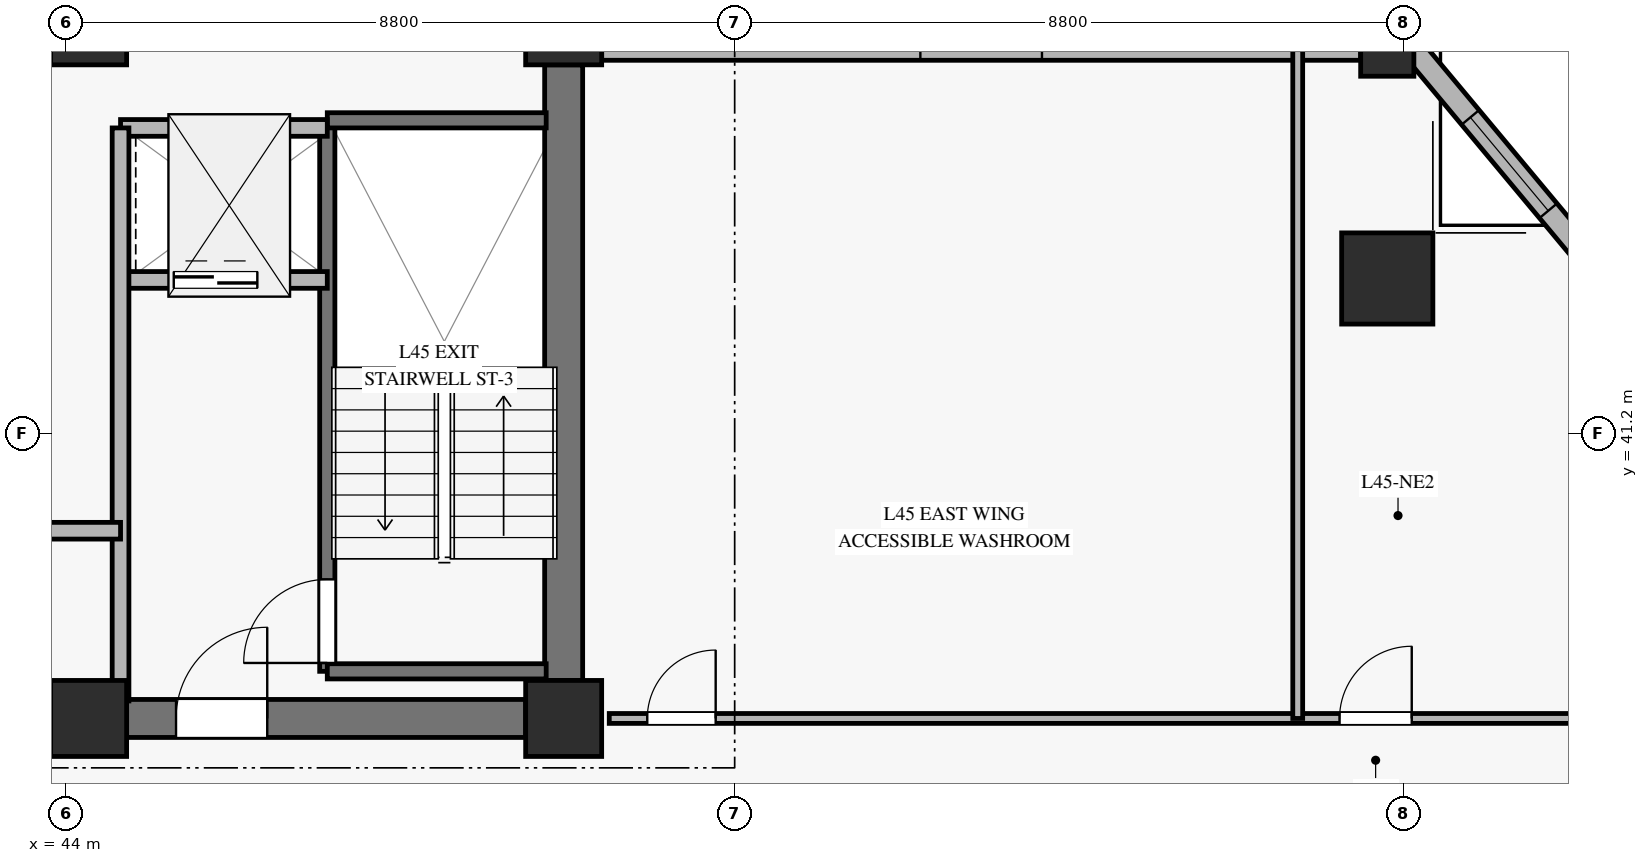
"""IFC4 building model, lengths in metres.
Left out: names, types, materials, properties, quantities, classifications, styles, units other than length and angle.
Written with IfcOpenShell. Run it as: python <this file> out.ifc"""

import sys

from ifc_helpers import new_model, si_unit, direction, frame, frame_2d, origin, origin_2d, place, context, subcontext, project, spatial, rectangle, hollow_rectangle, extrude, source, transform, mapped, element, fill, save


model = new_model("IFC4")
c1 = context("Model", 3, precision=1e-05, world=origin(), true_north=direction((0.0, 1.0)))
c2 = subcontext(c1, "Body", "Model", "MODEL_VIEW")
j1 = project(units=[si_unit("LENGTHUNIT", "METRE"), si_unit("PLANEANGLEUNIT", "RADIAN")], contexts=[c1])
p1 = place(None, origin())
s1 = spatial("IfcSite", under=j1, at=p1, CompositionType="ELEMENT")
p2 = place(p1, origin())
s2 = spatial("IfcBuilding", under=s1, at=p2, CompositionType="ELEMENT")
p3 = place(p2, frame((0.0, 0.0, 180.7)))
s3 = spatial("IfcBuildingStorey", under=s2, at=p3, CompositionType="ELEMENT", Elevation=180.7)
m1 = source(origin(), c2, "Body", "SweptSolid", [
    extrude(rectangle(XDim=1.0, YDim=1.0, at=origin_2d()), origin(), (0.0, 0.0, 1.0), 3.27),
])
for number, where, z_axis, x_axis in (
    (1, (44.3, 37.45, 0.0), (0.0, 0.0, 1.0), (1.0, 0.0, 0.0)),
    (2, (44.3, 46.55, 0.0), (0.0, 0.0, 1.0), (1.0, 0.0, 0.0)),
    (3, (50.55, 37.45, 0.0), (0.0, 0.0, 1.0), (1.0, 0.0, 0.0)),
    (4, (50.55, 46.55, 0.0), (0.0, 0.0, 1.0), (1.0, 0.0, 0.0)),
):
    element("IfcColumn", number, at=place(p3, frame(where, z_axis=z_axis, x_axis=x_axis)), inside=s3, PredefinedType="PILASTER", context=c2, shape_type="MappedRepresentation", body=[
        mapped(m1, transform((0.0, 0.0, 0.0), x_axis=(1.0, 0.0, 0.0), y_axis=(0.0, 1.0, 0.0), z_axis=(0.0, 0.0, 1.0), scale=1.0)),
    ])
p4 = place(p3, frame((44.8, 37.45, 0.0), z_axis=(0.0, 0.0, 1.0), x_axis=(1.0, 0.0, 0.0)))
e5 = element("IfcWall", 5, at=p4, inside=s3, PredefinedType="SHEAR", context=c2, shape_type="SweptSolid", body=[
    extrude(rectangle(XDim=5.25, YDim=0.5, at=frame_2d((2.625, 0.0))), origin(), (0.0, 0.0, 1.0), 3.27),
])
p5 = place(p4, frame((0.65, 0.0, 0.0)))
e6 = element("IfcOpeningElement", 6, at=p5, cuts=e5, PredefinedType="OPENING", context=c2, shape_type="SweptSolid", body=[
    extrude(rectangle(XDim=1.2, YDim=2.15, at=frame_2d((0.6, 1.075))), frame((0.0, 0.26, 0.0), z_axis=(0.0, -1.0, 0.0), x_axis=(1.0, 0.0, 0.0)), (0.0, 0.0, 1.0), 0.52),
])
p6 = place(p3, frame((50.55, 37.95, 0.0), z_axis=(0.0, 0.0, 1.0), x_axis=(0.0, 1.0, 0.0)))
e7 = element("IfcWall", 7, at=p6, inside=s3, PredefinedType="SHEAR", context=c2, shape_type="SweptSolid", body=[
    extrude(rectangle(XDim=8.1, YDim=0.5, at=frame_2d((4.05, 0.0))), origin(), (0.0, 0.0, 1.0), 3.27),
])
m2 = source(origin(), c2, "Body", "SweptSolid", [
    extrude(hollow_rectangle(XDim=1.2, YDim=1.2, WallThickness=0.055, at=origin_2d()), origin(), (0.0, 0.0, 1.0), 3.27),
])
p7 = place(p3, frame((61.386, 43.239, 0.0), z_axis=(0.0, 0.0, 1.0), x_axis=(1.0, 0.0, 0.0)))
e8 = element("IfcColumn", 8, at=p7, inside=s3, PredefinedType="COLUMN", context=c2, shape_type="MappedRepresentation", body=[
    mapped(m2, transform((0.0, 0.0, 0.0), x_axis=(1.0, 0.0, 0.0), y_axis=(0.0, 1.0, 0.0), z_axis=(0.0, 0.0, 1.0), scale=1.0)),
])
m3 = source(origin(), c2, "Body", "SweptSolid", [
    extrude(hollow_rectangle(XDim=0.7, YDim=0.7, WallThickness=0.032, at=origin_2d()), origin(), (0.0, 0.0, 1.0), 3.27),
])
p8 = place(p3, frame((61.386, 46.25, 0.0), z_axis=(0.0, 0.0, 1.0), x_axis=(1.0, 0.0, 0.0)))
e9 = element("IfcColumn", 9, at=p8, inside=s3, PredefinedType="COLUMN", context=c2, shape_type="MappedRepresentation", body=[
    mapped(m3, transform((0.0, 0.0, 0.0), x_axis=(1.0, 0.0, 0.0), y_axis=(0.0, 1.0, 0.0), z_axis=(0.0, 0.0, 1.0), scale=1.0)),
])
p9 = place(p3, frame((51.05, 46.25, 0.0), z_axis=(0.0, 0.0, 1.0), x_axis=(1.0, 0.0, 0.0)))
e10 = element("IfcWall", 10, at=p9, inside=s3, PredefinedType="SOLIDWALL", context=c2, shape_type="SweptSolid", body=[
    extrude(rectangle(XDim=9.986, YDim=0.28, at=frame_2d((4.993, 0.0))), origin(), (0.0, 0.0, 1.0), 2.75),
])
p10 = place(p9, frame((4.193, 0.0, 0.45)))
e11 = element("IfcOpeningElement", 11, at=p10, cuts=e10, PredefinedType="OPENING", context=c2, shape_type="SweptSolid", body=[
    extrude(rectangle(XDim=1.6, YDim=2.0, at=frame_2d((0.8, 1.0))), frame((0.0, 0.15, 0.0), z_axis=(0.0, -1.0, 0.0), x_axis=(1.0, 0.0, 0.0)), (0.0, 0.0, 1.0), 0.3),
])
p11 = place(p3, frame((64.247, 43.239, 0.0), z_axis=(0.0, 0.0, 1.0), x_axis=(-0.640459985381, 0.767991541051, 0.0)))
e12 = element("IfcWall", 12, at=p11, inside=s3, PredefinedType="SOLIDWALL", context=c2, shape_type="SweptSolid", body=[
    extrude(rectangle(XDim=3.921, YDim=0.3, at=frame_2d((1.96, 0.0))), origin(), (0.0, 0.0, 1.0), 2.75),
])
p12 = place(p11, frame((1.16, 0.0, 0.45)))
e13 = element("IfcOpeningElement", 13, at=p12, cuts=e12, PredefinedType="OPENING", context=c2, shape_type="SweptSolid", body=[
    extrude(rectangle(XDim=1.6, YDim=2.0, at=frame_2d((0.8, 1.0))), frame((0.0, 0.16, 0.0), z_axis=(0.0, -1.0, 0.0), x_axis=(1.0, 0.0, 0.0)), (0.0, 0.0, 1.0), 0.32),
])
p13 = place(p3, frame((47.44, 38.07, 0.0), z_axis=(0.0, 0.0, 1.0), x_axis=(0.0, 1.0, 0.0)))
e14 = element("IfcWall", 14, at=p13, inside=s3, PredefinedType="SOLIDWALL", context=c2, shape_type="SweptSolid", body=[
    extrude(rectangle(XDim=7.25, YDim=0.2, at=frame_2d((3.625, 0.0))), origin(), (0.0, 0.0, 1.0), 3.5),
])
p14 = place(p13, frame((0.11, 0.0, 0.0)))
e15 = element("IfcOpeningElement", 15, at=p14, cuts=e14, PredefinedType="OPENING", context=c2, shape_type="SweptSolid", body=[
    extrude(rectangle(XDim=1.1, YDim=2.15, at=frame_2d((0.55, 1.075))), frame((0.0, 0.11, 0.0), z_axis=(0.0, -1.0, 0.0), x_axis=(1.0, 0.0, 0.0)), (0.0, 0.0, 1.0), 0.22),
])
for number, where, z_axis, x_axis in (
    (16, (47.44, 45.32, 0.0), (0.0, 0.0, 1.0), (1.0, 0.0, 0.0)),
    (17, (47.44, 38.07, 0.0), (0.0, 0.0, 1.0), (1.0, 0.0, 0.0)),
):
    element("IfcWall", number, at=place(p3, frame(where, z_axis=z_axis, x_axis=x_axis)), inside=s3, PredefinedType="SOLIDWALL", context=c2, shape_type="SweptSolid", body=[
        extrude(rectangle(XDim=2.88, YDim=0.2, at=frame_2d((1.44, 0.0))), origin(), (0.0, 0.0, 1.0), 3.5),
    ])
p15 = place(p3, frame((44.72, 43.22, 0.0), z_axis=(0.0, 0.0, 1.0), x_axis=(1.0, 0.0, 0.0)))
e18 = element("IfcWall", 18, at=p15, inside=s3, PredefinedType="SOLIDWALL", context=c2, shape_type="SweptSolid", body=[
    extrude(rectangle(XDim=2.72, YDim=0.22, at=frame_2d((1.36, 0.0))), origin(), (0.0, 0.0, 1.0), 3.27),
])
p16 = place(p15, frame((0.7, 0.0, 0.0)))
e19 = element("IfcOpeningElement", 19, at=p16, cuts=e18, PredefinedType="OPENING", context=c2, shape_type="SweptSolid", body=[
    extrude(rectangle(XDim=1.1, YDim=2.2, at=frame_2d((0.55, 1.1))), frame((0.0, 0.12, 0.0), z_axis=(0.0, -1.0, 0.0), x_axis=(1.0, 0.0, 0.0)), (0.0, 0.0, 1.0), 0.24),
])
p17 = place(p3, frame((44.72, 45.22, 0.0), z_axis=(0.0, 0.0, 1.0), x_axis=(1.0, 0.0, 0.0)))
e20 = element("IfcWall", 20, at=p17, inside=s3, PredefinedType="SOLIDWALL", context=c2, shape_type="SweptSolid", body=[
    extrude(rectangle(XDim=2.72, YDim=0.22, at=frame_2d((1.36, 0.0))), origin(), (0.0, 0.0, 1.0), 3.27),
])
p18 = place(p3, frame((44.72, 37.68, 0.0), z_axis=(0.0, 0.0, 1.0), x_axis=(0.0, 1.0, 0.0)))
e21 = element("IfcWall", 21, at=p18, inside=s3, PredefinedType="SOLIDWALL", context=c2, shape_type="SweptSolid", body=[
    extrude(rectangle(XDim=7.54, YDim=0.22, at=frame_2d((3.77, 0.0))), origin(), (0.0, 0.0, 1.0), 3.27),
])
p19 = place(p3, frame((36.12, 39.92, 0.0), z_axis=(0.0, 0.0, 1.0), x_axis=(1.0, 0.0, 0.0)))
e22 = element("IfcWall", 22, at=p19, inside=s3, PredefinedType="SOLIDWALL", context=c2, shape_type="SweptSolid", body=[
    extrude(rectangle(XDim=8.6, YDim=0.22, at=frame_2d((4.3, 0.0))), origin(), (0.0, 0.0, 1.0), 2.555),
])
p20 = place(p3, frame((51.15, 37.45, 0.0), z_axis=(0.0, 0.0, 1.0), x_axis=(1.0, 0.0, 0.0)))
e23 = element("IfcWall", 23, at=p20, inside=s3, PredefinedType="PARTITIONING", context=c2, shape_type="SweptSolid", body=[
    extrude(rectangle(XDim=13.097, YDim=0.13, at=frame_2d((6.549, 0.0))), origin(), (0.0, 0.0, 1.0), 2.755),
])
p21 = place(p20, frame((0.5, 0.0, 0.0)))
e24 = element("IfcOpeningElement", 24, at=p21, cuts=e23, PredefinedType="OPENING", context=c2, shape_type="SweptSolid", body=[
    extrude(rectangle(XDim=0.9, YDim=2.1, at=frame_2d((0.45, 1.05))), frame((0.0, 0.075, 0.0), z_axis=(0.0, -1.0, 0.0), x_axis=(1.0, 0.0, 0.0)), (0.0, 0.0, 1.0), 0.15),
])
p22 = place(p20, frame((9.608, 0.0, 0.0)))
e25 = element("IfcOpeningElement", 25, at=p22, cuts=e23, PredefinedType="OPENING", context=c2, shape_type="SweptSolid", body=[
    extrude(rectangle(XDim=0.95, YDim=2.1, at=frame_2d((0.475, 1.05))), frame((0.0, 0.075, 0.0), z_axis=(0.0, -1.0, 0.0), x_axis=(1.0, 0.0, 0.0)), (0.0, 0.0, 1.0), 0.15),
])
p23 = place(p3, frame((60.208, 37.45, 0.0), z_axis=(0.0, 0.0, 1.0), x_axis=(0.0, 1.0, 0.0)))
e26 = element("IfcWall", 26, at=p23, inside=s3, PredefinedType="PARTITIONING", context=c2, shape_type="SweptSolid", body=[
    extrude(rectangle(XDim=8.8, YDim=0.13, at=frame_2d((4.4, 0.0))), origin(), (0.0, 0.0, 1.0), 3.27),
])
m4 = source(origin(), c2, "Body", "SweptSolid", [
    extrude(rectangle(XDim=1.6, YDim=2.0, at=frame_2d((0.8, 1.0))), frame((0.0, 0.03, 0.0), z_axis=(0.0, -1.0, 0.0), x_axis=(1.0, 0.0, 0.0)), (0.0, 0.0, 1.0), 0.06),
])
p24 = place(p12, origin())
e27 = element("IfcWindow", 27, at=p24, inside=s3, PartitioningType="SINGLE_PANEL", PredefinedType="WINDOW", context=c2, shape_type="MappedRepresentation", body=[
    mapped(m4, transform((0.0, 0.0, 0.0), x_axis=(1.0, 0.0, 0.0), y_axis=(0.0, 1.0, 0.0), z_axis=(0.0, 0.0, 1.0), scale=1.0)),
])
fill(e13, e27)
m5 = source(origin(), c2, "Body", "SweptSolid", [
    extrude(rectangle(XDim=1.1, YDim=2.15, at=frame_2d((0.55, 1.075))), frame((0.0, 0.025, 0.0), z_axis=(0.0, -1.0, 0.0), x_axis=(1.0, 0.0, 0.0)), (0.0, 0.0, 1.0), 0.05),
])
p25 = place(p14, origin())
e28 = element("IfcDoor", 28, at=p25, inside=s3, OperationType="SINGLE_SWING_LEFT", PredefinedType="DOOR", context=c2, shape_type="MappedRepresentation", body=[
    mapped(m5, transform((0.0, 0.0, 0.0), x_axis=(1.0, 0.0, 0.0), y_axis=(0.0, 1.0, 0.0), z_axis=(0.0, 0.0, 1.0), scale=1.0)),
])
fill(e15, e28)
m6 = source(origin(), c2, "Body", "SweptSolid", [
    extrude(rectangle(XDim=1.1, YDim=2.2, at=frame_2d((0.55, 1.1))), frame((0.0, 0.025, 0.0), z_axis=(0.0, -1.0, 0.0), x_axis=(1.0, 0.0, 0.0)), (0.0, 0.0, 1.0), 0.05),
])
p26 = place(p16, origin())
e29 = element("IfcDoor", 29, at=p26, inside=s3, OperationType="SLIDING_TO_LEFT", PredefinedType="DOOR", context=c2, shape_type="MappedRepresentation", body=[
    mapped(m6, transform((0.0, 0.0, 0.0), x_axis=(1.0, 0.0, 0.0), y_axis=(0.0, 1.0, 0.0), z_axis=(0.0, 0.0, 1.0), scale=1.0)),
])
fill(e19, e29)
m7 = source(origin(), c2, "Body", "SweptSolid", [
    extrude(rectangle(XDim=1.2, YDim=2.15, at=frame_2d((0.6, 1.075))), frame((0.0, 0.025, 0.0), z_axis=(0.0, -1.0, 0.0), x_axis=(1.0, 0.0, 0.0)), (0.0, 0.0, 1.0), 0.05),
])
p27 = place(p5, origin())
e30 = element("IfcDoor", 30, at=p27, inside=s3, OperationType="SINGLE_SWING_RIGHT", PredefinedType="DOOR", context=c2, shape_type="MappedRepresentation", body=[
    mapped(m7, transform((0.0, 0.0, 0.0), x_axis=(1.0, 0.0, 0.0), y_axis=(0.0, 1.0, 0.0), z_axis=(0.0, 0.0, 1.0), scale=1.0)),
])
fill(e6, e30)
m8 = source(origin(), c2, "Body", "SweptSolid", [
    extrude(rectangle(XDim=0.9, YDim=2.1, at=frame_2d((0.45, 1.05))), frame((0.0, 0.025, 0.0), z_axis=(0.0, -1.0, 0.0), x_axis=(1.0, 0.0, 0.0)), (0.0, 0.0, 1.0), 0.05),
])
p28 = place(p21, origin())
e31 = element("IfcDoor", 31, at=p28, inside=s3, OperationType="SINGLE_SWING_RIGHT", PredefinedType="DOOR", context=c2, shape_type="MappedRepresentation", body=[
    mapped(m8, transform((0.0, 0.0, 0.0), x_axis=(1.0, 0.0, 0.0), y_axis=(0.0, 1.0, 0.0), z_axis=(0.0, 0.0, 1.0), scale=1.0)),
])
fill(e24, e31)
m9 = source(origin(), c2, "Body", "SweptSolid", [
    extrude(rectangle(XDim=0.95, YDim=2.1, at=frame_2d((0.475, 1.05))), frame((0.0, 0.025, 0.0), z_axis=(0.0, -1.0, 0.0), x_axis=(1.0, 0.0, 0.0)), (0.0, 0.0, 1.0), 0.05),
])
p29 = place(p22, origin())
e32 = element("IfcDoor", 32, at=p29, inside=s3, OperationType="SINGLE_SWING_RIGHT", PredefinedType="DOOR", context=c2, shape_type="MappedRepresentation", body=[
    mapped(m9, transform((0.0, 0.0, 0.0), x_axis=(1.0, 0.0, 0.0), y_axis=(0.0, 1.0, 0.0), z_axis=(0.0, 0.0, 1.0), scale=1.0)),
])
fill(e25, e32)
save(model, sys.argv[1])
